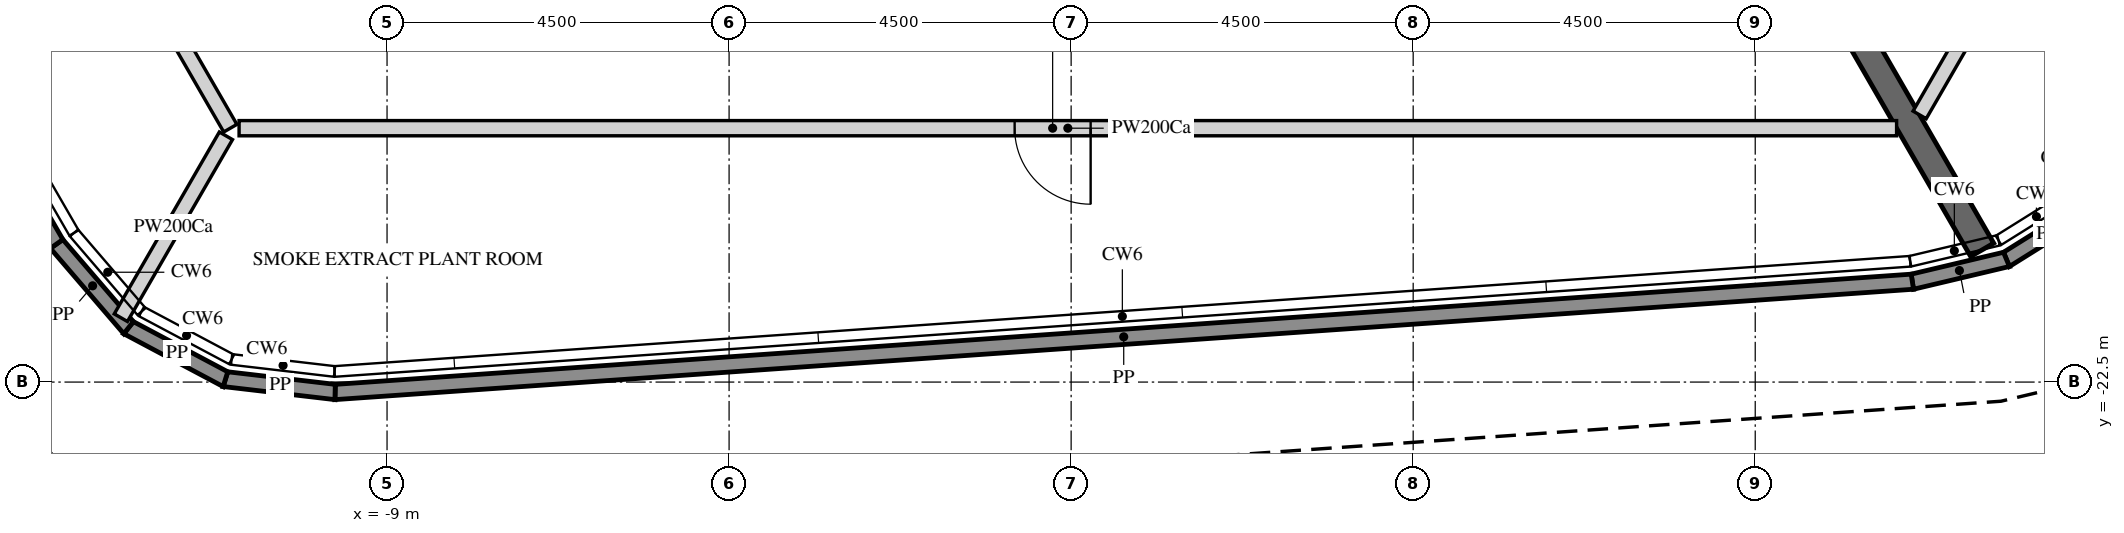
"""IFC4 building model, lengths in metres.
Left out: names, types, materials, properties, quantities, classifications, styles, units other than length and angle.
Written with IfcOpenShell. Run it as: python <this file> out.ifc"""

import sys

from ifc_helpers import new_model, si_unit, direction, frame, frame_2d, origin, place, context, subcontext, project, spatial, polyline, rectangle, outline, extrude, element, fill, save


model = new_model("IFC4")
c1 = context("Model", 3, precision=1e-05, world=origin(), true_north=direction((0.0, 1.0)))
c2 = subcontext(c1, "Body", "Model", "MODEL_VIEW")
j1 = project(units=[si_unit("LENGTHUNIT", "METRE"), si_unit("PLANEANGLEUNIT", "RADIAN")], contexts=[c1])
p1 = place(None, origin())
s1 = spatial("IfcSite", under=j1, at=p1, CompositionType="ELEMENT")
p2 = place(p1, origin())
s2 = spatial("IfcBuilding", under=s1, at=p2, CompositionType="ELEMENT")
p3 = place(p2, frame((0.0, 0.0, 388.2)))
s3 = spatial("IfcBuildingStorey", under=s2, at=p3, CompositionType="ELEMENT", Elevation=388.2)
p4 = place(p3, frame((13.378, -20.216, 4.5), z_axis=(0.0, 0.0, 1.0), x_axis=(-0.848139277309, -0.529773315943, 0.0)))
e1 = element("IfcWall", 1, at=p4, inside=s3, PredefinedType="PARAPET", context=c2, shape_type="SweptSolid", body=[
    extrude(outline(polyline([(0.016, -0.1), (1.248, -0.1), (1.281, 0.1), (-0.016, 0.1), (0.016, -0.1)])), origin(), (0.0, 0.0, 1.0), 1.1),
])
p5 = place(p3, frame((12.305, -20.886, 4.5), z_axis=(0.0, 0.0, 1.0), x_axis=(-0.973015728144, -0.230738797744, 0.0)))
e2 = element("IfcWall", 2, at=p5, inside=s3, PredefinedType="PARAPET", context=c2, shape_type="SweptSolid", body=[
    extrude(outline(polyline([(0.016, -0.1), (1.265, -0.1), (1.281, 0.1), (-0.016, 0.1), (0.016, -0.1)])), origin(), (0.0, 0.0, 1.0), 1.1),
])
p6 = place(p3, frame((11.067, -21.18, 4.5), z_axis=(0.0, 0.0, 1.0), x_axis=(-0.997564286722, -0.06975309209, 0.0)))
e3 = element("IfcWall", 3, at=p6, inside=s3, PredefinedType="PARAPET", context=c2, shape_type="SweptSolid", body=[
    extrude(outline(polyline([(0.008, -0.1), (20.792, -0.1), (20.81, 0.1), (-0.008, 0.1), (0.008, -0.1)])), origin(), (0.0, 0.0, 1.0), 1.1),
])
p7 = place(p3, frame((-9.683, -22.631, 4.5), z_axis=(0.0, 0.0, 1.0), x_axis=(-0.993231825369, 0.116148788514, 0.0)))
e4 = element("IfcWall", 4, at=p7, inside=s3, PredefinedType="PARAPET", context=c2, shape_type="SweptSolid", body=[
    extrude(outline(polyline([(0.009, -0.1), (1.434, -0.1), (1.471, 0.1), (-0.009, 0.1), (0.009, -0.1)])), origin(), (0.0, 0.0, 1.0), 1.1),
])
p8 = place(p3, frame((-11.126, -22.462, 4.5), z_axis=(0.0, 0.0, 1.0), x_axis=(-0.882946998442, 0.46947268072, 0.0)))
e5 = element("IfcWall", 5, at=p8, inside=s3, PredefinedType="PARAPET", context=c2, shape_type="SweptSolid", body=[
    extrude(outline(polyline([(0.019, -0.1), (1.424, -0.1), (1.462, 0.1), (-0.019, 0.1), (0.019, -0.1)])), origin(), (0.0, 0.0, 1.0), 1.1),
])
p9 = place(p3, frame((-12.4, -21.784, 4.5), z_axis=(0.0, 0.0, 1.0), x_axis=(-0.651635311812, 0.758532412228, 0.0)))
e6 = element("IfcWall", 6, at=p9, inside=s3, PredefinedType="PARAPET", context=c2, shape_type="SweptSolid", body=[
    extrude(outline(polyline([(0.019, -0.1), (1.443, -0.1), (1.462, 0.1), (-0.019, 0.1), (0.019, -0.1)])), origin(), (0.0, 0.0, 1.0), 1.1),
])
p10 = place(p3, frame((-13.347, -20.683, 4.5), z_axis=(0.0, 0.0, 1.0), x_axis=(-0.500005572435, 0.866022186514, 0.0)))
e7 = element("IfcWall", 7, at=p10, inside=s3, PredefinedType="PARAPET", context=c2, shape_type="SweptSolid", body=[
    extrude(outline(polyline([(0.009, -0.1), (20.793, -0.1), (20.809, 0.1), (-0.009, 0.1), (0.009, -0.1)])), origin(), (0.0, 0.0, 1.0), 1.1),
])
p11 = place(p3, frame((5.773, -10.0, -0.2), z_axis=(0.0, 0.0, 1.0), x_axis=(0.50001273609, -0.866018050475, 0.0)))
e8 = element("IfcWall", 8, at=p11, inside=s3, PredefinedType="SHEAR", context=c2, shape_type="SweptSolid", body=[
    extrude(rectangle(XDim=12.425, YDim=0.35, at=frame_2d((6.212, 0.0))), origin(), (0.0, 0.0, 1.0), 4.5),
])
p12 = place(p11, frame((5.312, 0.0, 0.2)))
e9 = element("IfcOpeningElement", 9, at=p12, cuts=e8, PredefinedType="OPENING", context=c2, shape_type="SweptSolid", body=[
    extrude(rectangle(XDim=1.8, YDim=2.4, at=frame_2d((0.9, 1.2))), frame((0.0, 0.185, 0.0), z_axis=(0.0, -1.0, 0.0), x_axis=(1.0, 0.0, 0.0)), (0.0, 0.0, 1.0), 0.37),
])
p13 = place(p3, frame((-11.062, -19.16, 0.0), z_axis=(0.0, 0.0, 1.0), x_axis=(-0.500000738101, 0.866024977641, 0.0)))
e10 = element("IfcWall", 10, at=p13, inside=s3, PredefinedType="PARTITIONING", context=c2, shape_type="SweptSolid", body=[
    extrude(rectangle(XDim=21.922, YDim=0.2, at=frame_2d((10.961, 0.0))), origin(), (0.0, 0.0, 1.0), 4.3),
])
p14 = place(p13, frame((10.611, 0.0, 0.0)))
e11 = element("IfcOpeningElement", 11, at=p14, cuts=e10, PredefinedType="OPENING", context=c2, shape_type="SweptSolid", body=[
    extrude(rectangle(XDim=1.0, YDim=2.1, at=frame_2d((0.5, 1.05))), frame((0.0, 0.11, 0.0), z_axis=(0.0, -1.0, 0.0), x_axis=(1.0, 0.0, 0.0)), (0.0, 0.0, 1.0), 0.22),
])
p15 = place(p3, frame((-12.502, -21.653, 0.0), z_axis=(0.0, 0.0, 1.0), x_axis=(0.500186343266, 0.865917791716, 0.0)))
e12 = element("IfcWall", 12, at=p15, inside=s3, PredefinedType="PARTITIONING", context=c2, shape_type="SweptSolid", body=[
    extrude(rectangle(XDim=2.764, YDim=0.2, at=frame_2d((1.382, 0.0))), origin(), (0.0, 0.0, 1.0), 4.3),
])
p16 = place(p3, frame((10.86, -19.16, 0.0), z_axis=(0.0, 0.0, 1.0), x_axis=(-1.0, 0.0, 0.0)))
e13 = element("IfcWall", 13, at=p16, inside=s3, PredefinedType="PARTITIONING", context=c2, shape_type="SweptSolid", body=[
    extrude(rectangle(XDim=21.807, YDim=0.2, at=frame_2d((10.903, 0.0))), origin(), (0.0, 0.0, 1.0), 4.3),
])
p17 = place(p16, frame((10.603, 0.0, 0.0)))
e14 = element("IfcOpeningElement", 14, at=p17, cuts=e13, PredefinedType="OPENING", context=c2, shape_type="SweptSolid", body=[
    extrude(rectangle(XDim=1.0, YDim=2.1, at=frame_2d((0.5, 1.05))), frame((0.0, 0.11, 0.0), z_axis=(0.0, -1.0, 0.0), x_axis=(1.0, 0.0, 0.0)), (0.0, 0.0, 1.0), 0.22),
])
p18 = place(p3, frame((22.124, 0.0, 0.0), z_axis=(0.0, 0.0, 1.0), x_axis=(-0.49999591573, -0.866027761826, 0.0)))
e15 = element("IfcWall", 15, at=p18, inside=s3, PredefinedType="PARTITIONING", context=c2, shape_type="SweptSolid", body=[
    extrude(rectangle(XDim=21.922, YDim=0.2, at=frame_2d((10.961, 0.0))), origin(), (0.0, 0.0, 1.0), 4.3),
])
p19 = place(p18, frame((10.611, 0.0, 0.0)))
e16 = element("IfcOpeningElement", 16, at=p19, cuts=e15, PredefinedType="OPENING", context=c2, shape_type="SweptSolid", body=[
    extrude(rectangle(XDim=1.0, YDim=2.1, at=frame_2d((0.5, 1.05))), frame((0.0, 0.11, 0.0), z_axis=(0.0, -1.0, 0.0), x_axis=(1.0, 0.0, 0.0)), (0.0, 0.0, 1.0), 0.22),
])
p20 = place(p17, origin())
e17 = element("IfcDoor", 17, at=p20, inside=s3, OperationType="SINGLE_SWING_RIGHT", PredefinedType="DOOR", context=c2, shape_type="SweptSolid", body=[
    extrude(rectangle(XDim=1.0, YDim=2.1, at=frame_2d((0.5, 1.05))), frame((0.0, 0.025, 0.0), z_axis=(0.0, -1.0, 0.0), x_axis=(1.0, 0.0, 0.0)), (0.0, 0.0, 1.0), 0.05),
])
fill(e14, e17)
save(model, sys.argv[1])
